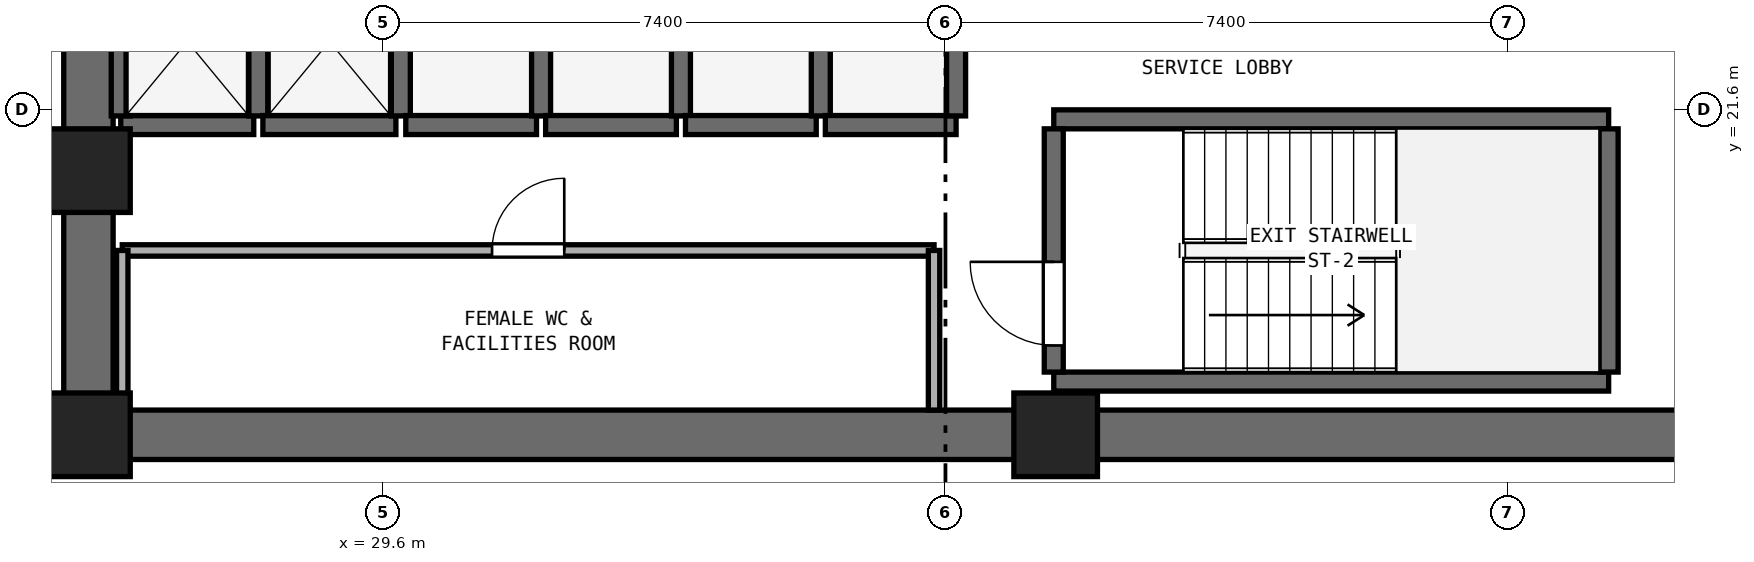
"""IFC4 building model, lengths in metres.
Left out: names, types, materials, properties, quantities, classifications, styles, units other than length and angle.
Written with IfcOpenShell. Run it as: python <this file> out.ifc"""

import sys

from ifc_helpers import new_model, si_unit, direction, frame, frame_2d, origin, origin_2d, place, context, subcontext, project, spatial, rectangle, extrude, element, fill, save


model = new_model("IFC4")
c1 = context("Model", 3, precision=1e-05, world=origin(), true_north=direction((0.0, 1.0)))
c2 = subcontext(c1, "Body", "Model", "MODEL_VIEW")
j1 = project(units=[si_unit("LENGTHUNIT", "METRE"), si_unit("PLANEANGLEUNIT", "RADIAN")], contexts=[c1])
p1 = place(None, origin())
s1 = spatial("IfcSite", under=j1, at=p1, CompositionType="ELEMENT")
p2 = place(p1, origin())
s2 = spatial("IfcBuilding", under=s1, at=p2, CompositionType="ELEMENT")
p3 = place(p2, frame((0.0, 0.0, 59.2)))
s3 = spatial("IfcBuildingStorey", under=s2, at=p3, CompositionType="ELEMENT", Elevation=59.2)
p4 = place(p3, frame((25.4, 17.325, 0.0), z_axis=(0.0, 0.0, 1.0), x_axis=(1.0, 0.0, 0.0)))
e1 = element("IfcWall", 1, at=p4, inside=s3, PredefinedType="SHEAR", context=c2, shape_type="SweptSolid", body=[
    extrude(rectangle(XDim=23.2, YDim=0.65, at=frame_2d((11.6, 0.0))), origin(), (0.0, 0.0, 1.0), 3.525),
])
p5 = place(p3, frame((25.725, 17.65, 0.0), z_axis=(0.0, 0.0, 1.0), x_axis=(0.0, 1.0, 0.0)))
e2 = element("IfcWall", 2, at=p5, inside=s3, PredefinedType="SHEAR", context=c2, shape_type="SweptSolid", body=[
    extrude(rectangle(XDim=15.1, YDim=0.65, at=frame_2d((7.55, 0.0))), origin(), (0.0, 0.0, 1.0), 3.525),
])
p6 = place(p5, frame((6.8, 0.0, 0.0)))
e3 = element("IfcOpeningElement", 3, at=p6, cuts=e2, PredefinedType="OPENING", context=c2, shape_type="SweptSolid", body=[
    extrude(rectangle(XDim=1.5, YDim=2.15, at=frame_2d((0.75, 1.075))), frame((0.0, 0.335, 0.0), z_axis=(0.0, -1.0, 0.0), x_axis=(1.0, 0.0, 0.0)), (0.0, 0.0, 1.0), 0.67),
])
for number, where, z_axis, x_axis in (
    (4, (25.725, 17.325, 0.0), (0.0, 0.0, 1.0), (1.0, 0.0, 0.0)),
    (5, (38.45, 17.325, 0.0), (0.0, 0.0, 1.0), (1.0, 0.0, 0.0)),
    (6, (25.725, 20.8, 0.0), (0.0, 0.0, 1.0), (1.0, 0.0, 0.0)),
):
    element("IfcColumn", number, at=place(p3, frame(where, z_axis=z_axis, x_axis=x_axis)), inside=s3, PredefinedType="PILASTER", context=c2, shape_type="SweptSolid", body=[
        extrude(rectangle(XDim=1.1, YDim=1.1, at=origin_2d()), origin(), (0.0, 0.0, 1.0), 3.8),
    ])
for number, where, z_axis, x_axis in (
    (7, (38.425, 18.025, 0.0), (0.0, 0.0, 1.0), (1.0, 0.0, 0.0)),
    (8, (38.425, 21.475, 0.0), (0.0, 0.0, 1.0), (1.0, 0.0, 0.0)),
):
    element("IfcWall", number, at=place(p3, frame(where, z_axis=z_axis, x_axis=x_axis)), inside=s3, PredefinedType="SHEAR", context=c2, shape_type="SweptSolid", body=[
        extrude(rectangle(XDim=7.3, YDim=0.25, at=frame_2d((3.65, 0.0))), origin(), (0.0, 0.0, 1.0), 3.525),
    ])
p7 = place(p3, frame((38.425, 18.15, 0.0), z_axis=(0.0, 0.0, 1.0), x_axis=(0.0, 1.0, 0.0)))
e9 = element("IfcWall", 9, at=p7, inside=s3, PredefinedType="SHEAR", context=c2, shape_type="SweptSolid", body=[
    extrude(rectangle(XDim=3.2, YDim=0.25, at=frame_2d((1.6, 0.0))), origin(), (0.0, 0.0, 1.0), 3.525),
])
p8 = place(p7, frame((0.35, 0.0, 0.0)))
e10 = element("IfcOpeningElement", 10, at=p8, cuts=e9, PredefinedType="OPENING", context=c2, shape_type="SweptSolid", body=[
    extrude(rectangle(XDim=1.1, YDim=2.15, at=frame_2d((0.55, 1.075))), frame((0.0, 0.135, 0.0), z_axis=(0.0, -1.0, 0.0), x_axis=(1.0, 0.0, 0.0)), (0.0, 0.0, 1.0), 0.27),
])
p9 = place(p3, frame((45.725, 18.15, 0.0), z_axis=(0.0, 0.0, 1.0), x_axis=(0.0, 1.0, 0.0)))
e11 = element("IfcWall", 11, at=p9, inside=s3, PredefinedType="SHEAR", context=c2, shape_type="SweptSolid", body=[
    extrude(rectangle(XDim=3.2, YDim=0.25, at=frame_2d((1.6, 0.0))), origin(), (0.0, 0.0, 1.0), 3.525),
])
p10 = place(p3, frame((26.15, 21.4, 0.0), z_axis=(0.0, 0.0, 1.0), x_axis=(1.0, 0.0, 0.0)))
e12 = element("IfcWall", 12, at=p10, inside=s3, PredefinedType="SHEAR", context=c2, shape_type="SweptSolid", body=[
    extrude(rectangle(XDim=1.75, YDim=0.25, at=frame_2d((0.875, 0.0))), origin(), (0.0, 0.0, 1.0), 3.525),
])
for number, where, z_axis, x_axis in (
    (13, (26.15, 21.52, 0.0), (0.0, 0.0, 1.0), (0.0, 1.0, 0.0)),
    (14, (27.96, 21.52, 0.0), (0.0, 0.0, 1.0), (0.0, 1.0, 0.0)),
):
    element("IfcWall", number, at=place(p3, frame(where, z_axis=z_axis, x_axis=x_axis)), inside=s3, PredefinedType="SHEAR", context=c2, shape_type="SweptSolid", body=[
        extrude(rectangle(XDim=1.96, YDim=0.25, at=frame_2d((0.98, 0.0))), origin(), (0.0, 0.0, 1.0), 3.525),
    ])
p11 = place(p3, frame((28.02, 21.4, 0.0), z_axis=(0.0, 0.0, 1.0), x_axis=(1.0, 0.0, 0.0)))
e15 = element("IfcWall", 15, at=p11, inside=s3, PredefinedType="SHEAR", context=c2, shape_type="SweptSolid", body=[
    extrude(rectangle(XDim=1.75, YDim=0.25, at=frame_2d((0.875, 0.0))), origin(), (0.0, 0.0, 1.0), 3.525),
])
p12 = place(p3, frame((29.835, 21.52, 0.0), z_axis=(0.0, 0.0, 1.0), x_axis=(0.0, 1.0, 0.0)))
e16 = element("IfcWall", 16, at=p12, inside=s3, PredefinedType="SHEAR", context=c2, shape_type="SweptSolid", body=[
    extrude(rectangle(XDim=1.96, YDim=0.25, at=frame_2d((0.98, 0.0))), origin(), (0.0, 0.0, 1.0), 3.525),
])
p13 = place(p3, frame((29.9, 21.4, 0.0), z_axis=(0.0, 0.0, 1.0), x_axis=(1.0, 0.0, 0.0)))
e17 = element("IfcWall", 17, at=p13, inside=s3, PredefinedType="SHEAR", context=c2, shape_type="SweptSolid", body=[
    extrude(rectangle(XDim=1.72, YDim=0.25, at=frame_2d((0.86, 0.0))), origin(), (0.0, 0.0, 1.0), 3.525),
])
p14 = place(p3, frame((31.68, 21.52, 0.0), z_axis=(0.0, 0.0, 1.0), x_axis=(0.0, 1.0, 0.0)))
e18 = element("IfcWall", 18, at=p14, inside=s3, PredefinedType="SHEAR", context=c2, shape_type="SweptSolid", body=[
    extrude(rectangle(XDim=1.96, YDim=0.25, at=frame_2d((0.98, 0.0))), origin(), (0.0, 0.0, 1.0), 3.525),
])
p15 = place(p3, frame((31.74, 21.4, 0.0), z_axis=(0.0, 0.0, 1.0), x_axis=(1.0, 0.0, 0.0)))
e19 = element("IfcWall", 19, at=p15, inside=s3, PredefinedType="SHEAR", context=c2, shape_type="SweptSolid", body=[
    extrude(rectangle(XDim=1.72, YDim=0.25, at=frame_2d((0.86, 0.0))), origin(), (0.0, 0.0, 1.0), 3.525),
])
p16 = place(p3, frame((33.52, 21.52, 0.0), z_axis=(0.0, 0.0, 1.0), x_axis=(0.0, 1.0, 0.0)))
e20 = element("IfcWall", 20, at=p16, inside=s3, PredefinedType="SHEAR", context=c2, shape_type="SweptSolid", body=[
    extrude(rectangle(XDim=1.96, YDim=0.25, at=frame_2d((0.98, 0.0))), origin(), (0.0, 0.0, 1.0), 3.525),
])
p17 = place(p3, frame((33.58, 21.4, 0.0), z_axis=(0.0, 0.0, 1.0), x_axis=(1.0, 0.0, 0.0)))
e21 = element("IfcWall", 21, at=p17, inside=s3, PredefinedType="SHEAR", context=c2, shape_type="SweptSolid", body=[
    extrude(rectangle(XDim=1.72, YDim=0.25, at=frame_2d((0.86, 0.0))), origin(), (0.0, 0.0, 1.0), 3.525),
])
p18 = place(p3, frame((35.36, 21.52, 0.0), z_axis=(0.0, 0.0, 1.0), x_axis=(0.0, 1.0, 0.0)))
e22 = element("IfcWall", 22, at=p18, inside=s3, PredefinedType="SHEAR", context=c2, shape_type="SweptSolid", body=[
    extrude(rectangle(XDim=1.96, YDim=0.25, at=frame_2d((0.98, 0.0))), origin(), (0.0, 0.0, 1.0), 3.525),
])
p19 = place(p3, frame((35.42, 21.4, 0.0), z_axis=(0.0, 0.0, 1.0), x_axis=(1.0, 0.0, 0.0)))
e23 = element("IfcWall", 23, at=p19, inside=s3, PredefinedType="SHEAR", context=c2, shape_type="SweptSolid", body=[
    extrude(rectangle(XDim=1.72, YDim=0.25, at=frame_2d((0.86, 0.0))), origin(), (0.0, 0.0, 1.0), 3.525),
])
p20 = place(p3, frame((37.14, 21.52, 0.0), z_axis=(0.0, 0.0, 1.0), x_axis=(0.0, 1.0, 0.0)))
e24 = element("IfcWall", 24, at=p20, inside=s3, PredefinedType="SHEAR", context=c2, shape_type="SweptSolid", body=[
    extrude(rectangle(XDim=1.96, YDim=0.25, at=frame_2d((0.98, 0.0))), origin(), (0.0, 0.0, 1.0), 3.525),
])
p21 = place(p3, frame((26.17, 19.75, 0.0), z_axis=(0.0, 0.0, 1.0), x_axis=(1.0, 0.0, 0.0)))
e25 = element("IfcWall", 25, at=p21, inside=s3, PredefinedType="PARTITIONING", context=c2, shape_type="SweptSolid", body=[
    extrude(rectangle(XDim=10.68, YDim=0.15, at=frame_2d((5.34, 0.0))), origin(), (0.0, 0.0, 1.0), 3.525),
])
p22 = place(p21, frame((4.865, 0.0, 0.0)))
e26 = element("IfcOpeningElement", 26, at=p22, cuts=e25, PredefinedType="OPENING", context=c2, shape_type="SweptSolid", body=[
    extrude(rectangle(XDim=0.95, YDim=2.1, at=frame_2d((0.475, 1.05))), frame((0.0, 0.085, 0.0), z_axis=(0.0, -1.0, 0.0), x_axis=(1.0, 0.0, 0.0)), (0.0, 0.0, 1.0), 0.17),
])
for number, where, z_axis, x_axis in (
    (27, (26.17, 17.65, 0.0), (0.0, 0.0, 1.0), (0.0, 1.0, 0.0)),
    (28, (36.85, 17.65, 0.0), (0.0, 0.0, 1.0), (0.0, 1.0, 0.0)),
):
    element("IfcWall", number, at=place(p3, frame(where, z_axis=z_axis, x_axis=x_axis)), inside=s3, PredefinedType="PARTITIONING", context=c2, shape_type="SweptSolid", body=[
        extrude(rectangle(XDim=2.1, YDim=0.15, at=frame_2d((1.05, 0.0))), origin(), (0.0, 0.0, 1.0), 3.525),
    ])
p23 = place(p8, origin())
e29 = element("IfcDoor", 29, at=p23, inside=s3, OperationType="SINGLE_SWING_RIGHT", PredefinedType="DOOR", context=c2, shape_type="SweptSolid", body=[
    extrude(rectangle(XDim=1.1, YDim=2.15, at=frame_2d((0.55, 1.075))), frame((0.0, 0.025, 0.0), z_axis=(0.0, -1.0, 0.0), x_axis=(1.0, 0.0, 0.0)), (0.0, 0.0, 1.0), 0.05),
])
fill(e10, e29)
p24 = place(p22, origin())
e30 = element("IfcDoor", 30, at=p24, inside=s3, OperationType="SINGLE_SWING_RIGHT", PredefinedType="DOOR", context=c2, shape_type="SweptSolid", body=[
    extrude(rectangle(XDim=0.95, YDim=2.1, at=frame_2d((0.475, 1.05))), frame((0.0, 0.025, 0.0), z_axis=(0.0, -1.0, 0.0), x_axis=(1.0, 0.0, 0.0)), (0.0, 0.0, 1.0), 0.05),
])
fill(e26, e30)
save(model, sys.argv[1])
